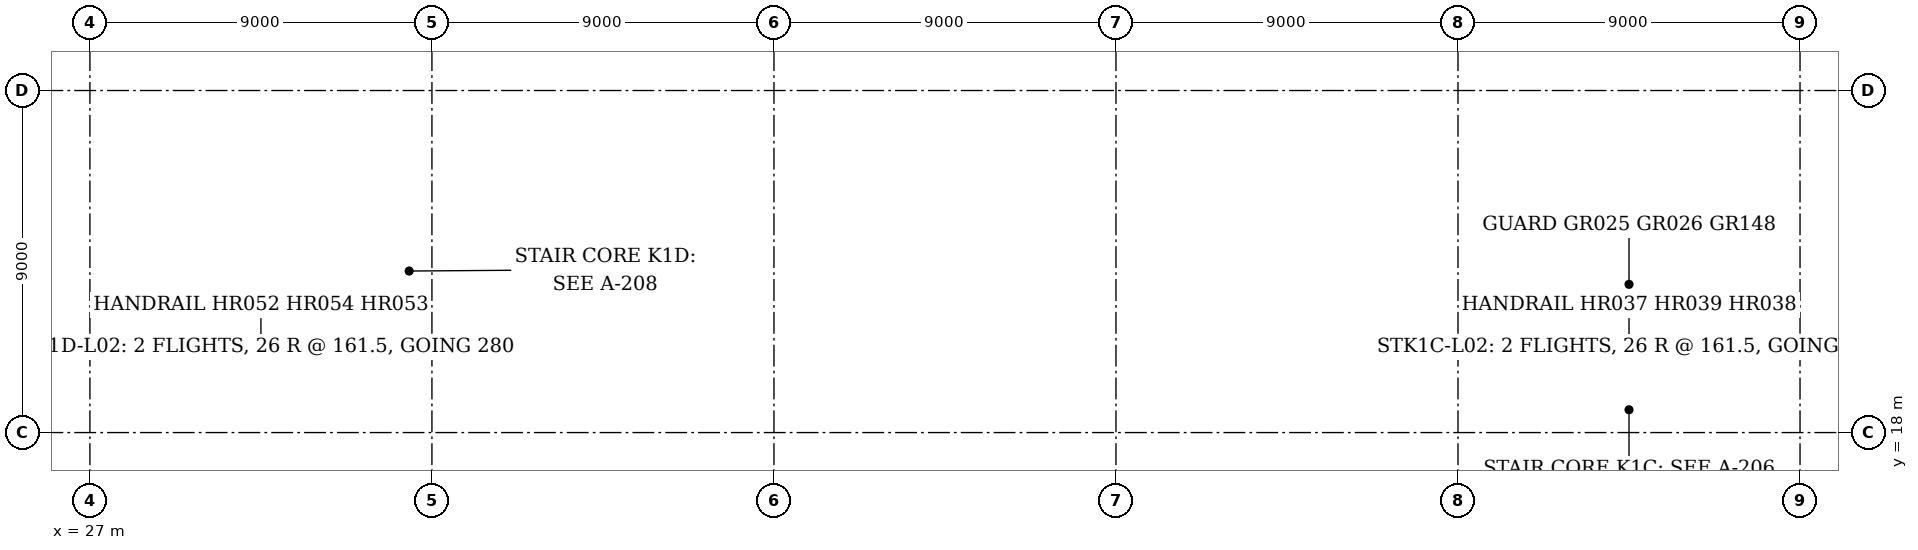
"""IFC4 building model, lengths in metres.
Left out: names, types, materials, properties, quantities, classifications, styles, units other than length and angle.
Written with IfcOpenShell. Run it as: python <this file> out.ifc"""

import sys

from ifc_helpers import new_model, si_unit, direction, frame, frame_2d, origin, origin_2d, place, context, subcontext, project, spatial, rectangle, hollow_rectangle, i_section, extrude, element, fill, save


model = new_model("IFC4")
c1 = context("Model", 3, precision=1e-05, world=origin(), true_north=direction((0.0, 1.0)))
c2 = subcontext(c1, "Body", "Model", "MODEL_VIEW")
j1 = project(units=[si_unit("LENGTHUNIT", "METRE"), si_unit("PLANEANGLEUNIT", "RADIAN")], contexts=[c1])
p1 = place(None, origin())
s1 = spatial("IfcSite", under=j1, at=p1, CompositionType="ELEMENT")
p2 = place(p1, origin())
s2 = spatial("IfcBuilding", under=s1, at=p2, CompositionType="ELEMENT")
p3 = place(p2, frame((0.0, 0.0, 9.2)))
s3 = spatial("IfcBuildingStorey", under=s2, at=p3, CompositionType="ELEMENT", Elevation=9.2)
p4 = place(p3, frame((45.0, 18.0, 0.0), z_axis=(0.0, 0.0, 1.0), x_axis=(1.0, 0.0, 0.0)))
e1 = element("IfcColumn", 1, at=p4, inside=s3, PredefinedType="COLUMN", context=c2, shape_type="SweptSolid", body=[
    extrude(hollow_rectangle(XDim=0.3, YDim=0.3, WallThickness=0.016, InnerFilletRadius=0.024, OuterFilletRadius=0.04, at=origin_2d()), origin(), (0.0, 0.0, 1.0), 4.2),
])
p5 = place(p3, frame((54.0, 18.0, 0.0), z_axis=(0.0, 0.0, 1.0), x_axis=(1.0, 0.0, 0.0)))
e2 = element("IfcColumn", 2, at=p5, inside=s3, PredefinedType="COLUMN", context=c2, shape_type="SweptSolid", body=[
    extrude(i_section(OverallWidth=0.5, OverallDepth=0.48, WebThickness=0.04, FlangeThickness=0.04, at=origin_2d()), origin(), (0.0, 0.0, 1.0), 3.335),
])
p6 = place(p3, frame((27.0, 27.0, 0.0), z_axis=(0.0, 0.0, 1.0), x_axis=(1.0, 0.0, 0.0)))
e3 = element("IfcColumn", 3, at=p6, inside=s3, PredefinedType="COLUMN", context=c2, shape_type="SweptSolid", body=[
    extrude(hollow_rectangle(XDim=0.3, YDim=0.3, WallThickness=0.01, InnerFilletRadius=0.015, OuterFilletRadius=0.025, at=origin_2d()), origin(), (0.0, 0.0, 1.0), 4.2),
])
p7 = place(p3, frame((36.0, 27.0, 0.0), z_axis=(0.0, 0.0, 1.0), x_axis=(1.0, 0.0, 0.0)))
e4 = element("IfcColumn", 4, at=p7, inside=s3, PredefinedType="COLUMN", context=c2, shape_type="SweptSolid", body=[
    extrude(i_section(OverallWidth=0.5, OverallDepth=0.48, WebThickness=0.04, FlangeThickness=0.04, at=origin_2d()), origin(), (0.0, 0.0, 1.0), 3.335),
])
p8 = place(p3, frame((45.0, 27.0, 0.0), z_axis=(0.0, 0.0, 1.0), x_axis=(1.0, 0.0, 0.0)))
e5 = element("IfcColumn", 5, at=p8, inside=s3, PredefinedType="COLUMN", context=c2, shape_type="SweptSolid", body=[
    extrude(i_section(OverallWidth=0.254, OverallDepth=0.254, WebThickness=0.009, FlangeThickness=0.014, FilletRadius=0.014, at=origin_2d()), origin(), (0.0, 0.0, 1.0), 4.2),
])
p9 = place(p3, frame((54.0, 27.0, 0.0), z_axis=(0.0, 0.0, 1.0), x_axis=(1.0, 0.0, 0.0)))
e6 = element("IfcColumn", 6, at=p9, inside=s3, PredefinedType="COLUMN", context=c2, shape_type="SweptSolid", body=[
    extrude(i_section(OverallWidth=0.5, OverallDepth=0.48, WebThickness=0.04, FlangeThickness=0.04, at=origin_2d()), origin(), (0.0, 0.0, 1.0), 3.335),
])
p10 = place(p3, frame((63.0, 27.0, 0.0), z_axis=(0.0, 0.0, 1.0), x_axis=(1.0, 0.0, 0.0)))
e7 = element("IfcColumn", 7, at=p10, inside=s3, PredefinedType="COLUMN", context=c2, shape_type="SweptSolid", body=[
    extrude(i_section(OverallWidth=0.305, OverallDepth=0.308, WebThickness=0.01, FlangeThickness=0.015, FilletRadius=0.017, at=origin_2d()), origin(), (0.0, 0.0, 1.0), 4.2),
])
p11 = place(p3, frame((27.09, 27.15, 0.0), z_axis=(0.0, 0.0, 1.0), x_axis=(0.0, 1.0, 0.0)))
e8 = element("IfcWall", 8, at=p11, inside=s3, PredefinedType="SOLIDWALL", context=c2, shape_type="SweptSolid", body=[
    extrude(rectangle(XDim=8.7, YDim=0.3, at=frame_2d((4.35, 0.0))), origin(), (0.0, 0.0, 1.0), 3.578),
])
p12 = place(p11, frame((1.5, 0.0, 0.9)))
e9 = element("IfcOpeningElement", 9, at=p12, cuts=e8, PredefinedType="OPENING", context=c2, shape_type="SweptSolid", body=[
    extrude(rectangle(XDim=1.2, YDim=2.3, at=frame_2d((0.6, 1.15))), frame((0.0, 0.16, 0.0), z_axis=(0.0, -1.0, 0.0), x_axis=(1.0, 0.0, 0.0)), (0.0, 0.0, 1.0), 0.32),
])
p13 = place(p11, frame((6.0, 0.0, 0.9)))
e10 = element("IfcOpeningElement", 10, at=p13, cuts=e8, PredefinedType="OPENING", context=c2, shape_type="SweptSolid", body=[
    extrude(rectangle(XDim=1.2, YDim=2.3, at=frame_2d((0.6, 1.15))), frame((0.0, 0.16, 0.0), z_axis=(0.0, -1.0, 0.0), x_axis=(1.0, 0.0, 0.0)), (0.0, 0.0, 1.0), 0.32),
])
p14 = place(p3, frame((27.09, 22.5, 0.0), z_axis=(0.0, 0.0, 1.0), x_axis=(0.0, 1.0, 0.0)))
e11 = element("IfcWall", 11, at=p14, inside=s3, PredefinedType="SOLIDWALL", context=c2, shape_type="SweptSolid", body=[
    extrude(rectangle(XDim=4.35, YDim=0.3, at=frame_2d((2.175, 0.0))), origin(), (0.0, 0.0, 1.0), 3.578),
])
p15 = place(p3, frame((36.0, 18.09, 0.0), z_axis=(0.0, 0.0, 1.0), x_axis=(1.0, 0.0, 0.0)))
e12 = element("IfcWall", 12, at=p15, inside=s3, PredefinedType="SOLIDWALL", context=c2, shape_type="SweptSolid", body=[
    extrude(rectangle(XDim=8.85, YDim=0.3, at=frame_2d((4.425, 0.0))), origin(), (0.0, 0.0, 1.0), 3.502),
])
p16 = place(p15, frame((1.65, 0.0, 0.9)))
e13 = element("IfcOpeningElement", 13, at=p16, cuts=e12, PredefinedType="OPENING", context=c2, shape_type="SweptSolid", body=[
    extrude(rectangle(XDim=1.2, YDim=2.3, at=frame_2d((0.6, 1.15))), frame((0.0, 0.16, 0.0), z_axis=(0.0, -1.0, 0.0), x_axis=(1.0, 0.0, 0.0)), (0.0, 0.0, 1.0), 0.32),
])
p17 = place(p15, frame((6.15, 0.0, 0.9)))
e14 = element("IfcOpeningElement", 14, at=p17, cuts=e12, PredefinedType="OPENING", context=c2, shape_type="SweptSolid", body=[
    extrude(rectangle(XDim=1.2, YDim=2.3, at=frame_2d((0.6, 1.15))), frame((0.0, 0.16, 0.0), z_axis=(0.0, -1.0, 0.0), x_axis=(1.0, 0.0, 0.0)), (0.0, 0.0, 1.0), 0.32),
])
p18 = place(p3, frame((54.25, 18.09, 0.0), z_axis=(0.0, 0.0, 1.0), x_axis=(1.0, 0.0, 0.0)))
e15 = element("IfcWall", 15, at=p18, inside=s3, PredefinedType="SOLIDWALL", context=c2, shape_type="SweptSolid", body=[
    extrude(rectangle(XDim=8.75, YDim=0.3, at=frame_2d((4.375, 0.0))), origin(), (0.0, 0.0, 1.0), 3.578),
])
p19 = place(p18, frame((1.4, 0.0, 0.9)))
e16 = element("IfcOpeningElement", 16, at=p19, cuts=e15, PredefinedType="OPENING", context=c2, shape_type="SweptSolid", body=[
    extrude(rectangle(XDim=1.2, YDim=2.3, at=frame_2d((0.6, 1.15))), frame((0.0, 0.16, 0.0), z_axis=(0.0, -1.0, 0.0), x_axis=(1.0, 0.0, 0.0)), (0.0, 0.0, 1.0), 0.32),
])
p20 = place(p18, frame((5.9, 0.0, 0.9)))
e17 = element("IfcOpeningElement", 17, at=p20, cuts=e15, PredefinedType="OPENING", context=c2, shape_type="SweptSolid", body=[
    extrude(rectangle(XDim=1.2, YDim=2.3, at=frame_2d((0.6, 1.15))), frame((0.0, 0.16, 0.0), z_axis=(0.0, -1.0, 0.0), x_axis=(1.0, 0.0, 0.0)), (0.0, 0.0, 1.0), 0.32),
])
p21 = place(p3, frame((72.1, 9.0, 0.0), z_axis=(0.0, 0.0, 1.0), x_axis=(0.0, 1.0, 0.0)))
e18 = element("IfcWall", 18, at=p21, inside=s3, PredefinedType="SOLIDWALL", context=c2, shape_type="SweptSolid", body=[
    extrude(rectangle(XDim=9.0, YDim=0.32, at=frame_2d((4.5, 0.0))), origin(), (0.0, 0.0, 1.0), 4.035),
])
p22 = place(p3, frame((63.0, 18.15, 0.0), z_axis=(0.0, 0.0, 1.0), x_axis=(1.0, 0.0, 0.0)))
e19 = element("IfcWall", 19, at=p22, inside=s3, PredefinedType="SOLIDWALL", context=c2, shape_type="SweptSolid", body=[
    extrude(rectangle(XDim=9.0, YDim=0.3, at=frame_2d((4.5, 0.0))), origin(), (0.0, 0.0, 1.0), 4.2),
])
p23 = place(p3, frame((71.85, 18.3, 0.0), z_axis=(0.0, 0.0, 1.0), x_axis=(0.0, 1.0, 0.0)))
e20 = element("IfcWall", 20, at=p23, inside=s3, PredefinedType="SOLIDWALL", context=c2, shape_type="SweptSolid", body=[
    extrude(rectangle(XDim=3.9, YDim=0.3, at=frame_2d((1.95, 0.0))), origin(), (0.0, 0.0, 1.0), 4.2),
])
p24 = place(p3, frame((63.0, 22.35, 0.0), z_axis=(0.0, 0.0, 1.0), x_axis=(1.0, 0.0, 0.0)))
e21 = element("IfcWall", 21, at=p24, inside=s3, PredefinedType="SOLIDWALL", context=c2, shape_type="SweptSolid", body=[
    extrude(rectangle(XDim=9.0, YDim=0.3, at=frame_2d((4.5, 0.0))), origin(), (0.0, 0.0, 1.0), 4.2),
])
p25 = place(p3, frame((63.15, 18.3, 0.0), z_axis=(0.0, 0.0, 1.0), x_axis=(0.0, 1.0, 0.0)))
e22 = element("IfcWall", 22, at=p25, inside=s3, PredefinedType="SOLIDWALL", context=c2, shape_type="SweptSolid", body=[
    extrude(rectangle(XDim=3.9, YDim=0.3, at=frame_2d((1.95, 0.0))), origin(), (0.0, 0.0, 1.0), 4.2),
])
p26 = place(p25, frame((1.05, 0.0, 0.0)))
e23 = element("IfcOpeningElement", 23, at=p26, cuts=e22, PredefinedType="OPENING", context=c2, shape_type="SweptSolid", body=[
    extrude(rectangle(XDim=1.8, YDim=2.1, at=frame_2d((0.9, 1.05))), frame((0.0, 0.16, 0.0), z_axis=(0.0, -1.0, 0.0), x_axis=(1.0, 0.0, 0.0)), (0.0, 0.0, 1.0), 0.32),
])
p27 = place(p3, frame((27.0, 18.15, 0.0), z_axis=(0.0, 0.0, 1.0), x_axis=(1.0, 0.0, 0.0)))
e24 = element("IfcWall", 24, at=p27, inside=s3, PredefinedType="SOLIDWALL", context=c2, shape_type="SweptSolid", body=[
    extrude(rectangle(XDim=9.0, YDim=0.3, at=frame_2d((4.5, 0.0))), origin(), (0.0, 0.0, 1.0), 4.2),
])
p28 = place(p3, frame((35.85, 18.3, 0.0), z_axis=(0.0, 0.0, 1.0), x_axis=(0.0, 1.0, 0.0)))
e25 = element("IfcWall", 25, at=p28, inside=s3, PredefinedType="SOLIDWALL", context=c2, shape_type="SweptSolid", body=[
    extrude(rectangle(XDim=3.9, YDim=0.3, at=frame_2d((1.95, 0.0))), origin(), (0.0, 0.0, 1.0), 4.2),
])
p29 = place(p28, frame((1.05, 0.0, 0.0)))
e26 = element("IfcOpeningElement", 26, at=p29, cuts=e25, PredefinedType="OPENING", context=c2, shape_type="SweptSolid", body=[
    extrude(rectangle(XDim=1.8, YDim=2.1, at=frame_2d((0.9, 1.05))), frame((0.0, 0.16, 0.0), z_axis=(0.0, -1.0, 0.0), x_axis=(1.0, 0.0, 0.0)), (0.0, 0.0, 1.0), 0.32),
])
p30 = place(p3, frame((27.0, 22.35, 0.0), z_axis=(0.0, 0.0, 1.0), x_axis=(1.0, 0.0, 0.0)))
e27 = element("IfcWall", 27, at=p30, inside=s3, PredefinedType="SOLIDWALL", context=c2, shape_type="SweptSolid", body=[
    extrude(rectangle(XDim=9.0, YDim=0.3, at=frame_2d((4.5, 0.0))), origin(), (0.0, 0.0, 1.0), 4.2),
])
p31 = place(p3, frame((27.15, 18.3, 0.0), z_axis=(0.0, 0.0, 1.0), x_axis=(0.0, 1.0, 0.0)))
e28 = element("IfcWall", 28, at=p31, inside=s3, PredefinedType="SOLIDWALL", context=c2, shape_type="SweptSolid", body=[
    extrude(rectangle(XDim=3.9, YDim=0.3, at=frame_2d((1.95, 0.0))), origin(), (0.0, 0.0, 1.0), 4.2),
])
p32 = place(p3, frame((72.0, 27.15, 0.0), z_axis=(0.0, 0.0, 1.0), x_axis=(1.0, 0.0, 0.0)))
e29 = element("IfcWall", 29, at=p32, inside=s3, PredefinedType="SOLIDWALL", context=c2, shape_type="SweptSolid", body=[
    extrude(rectangle(XDim=4.5, YDim=0.3, at=frame_2d((2.25, 0.0))), origin(), (0.0, 0.0, 1.0), 4.2),
])
p33 = place(p3, frame((72.15, 27.3, 0.0), z_axis=(0.0, 0.0, 1.0), x_axis=(0.0, 1.0, 0.0)))
e30 = element("IfcWall", 30, at=p33, inside=s3, PredefinedType="SOLIDWALL", context=c2, shape_type="SweptSolid", body=[
    extrude(rectangle(XDim=8.4, YDim=0.3, at=frame_2d((4.2, 0.0))), origin(), (0.0, 0.0, 1.0), 4.2),
])
p34 = place(p33, frame((0.45, 0.0, 0.0)))
e31 = element("IfcOpeningElement", 31, at=p34, cuts=e30, PredefinedType="OPENING", context=c2, shape_type="SweptSolid", body=[
    extrude(rectangle(XDim=1.4, YDim=2.1, at=frame_2d((0.7, 1.05))), frame((0.0, 0.16, 0.0), z_axis=(0.0, -1.0, 0.0), x_axis=(1.0, 0.0, 0.0)), (0.0, 0.0, 1.0), 0.32),
])
p35 = place(p3, frame((27.15, 27.0, 0.0), z_axis=(0.0, 0.0, 1.0), x_axis=(1.0, 0.0, 0.0)))
e32 = element("IfcWall", 32, at=p35, inside=s3, PredefinedType="PARTITIONING", context=c2, shape_type="SweptSolid", body=[
    extrude(rectangle(XDim=8.6, YDim=0.15, at=frame_2d((4.3, 0.0))), origin(), (0.0, 0.0, 1.0), 3.502),
])
p36 = place(p3, frame((36.25, 27.0, 0.0), z_axis=(0.0, 0.0, 1.0), x_axis=(1.0, 0.0, 0.0)))
e33 = element("IfcWall", 33, at=p36, inside=s3, PredefinedType="PARTITIONING", context=c2, shape_type="SweptSolid", body=[
    extrude(rectangle(XDim=8.877, YDim=0.15, at=frame_2d((4.438, 0.0))), origin(), (0.0, 0.0, 1.0), 3.502),
])
p37 = place(p36, frame((3.25, 0.0, 0.0)))
e34 = element("IfcOpeningElement", 34, at=p37, cuts=e33, PredefinedType="OPENING", context=c2, shape_type="SweptSolid", body=[
    extrude(rectangle(XDim=2.4, YDim=2.4, at=frame_2d((1.2, 1.2))), frame((0.0, 0.085, 0.0), z_axis=(0.0, -1.0, 0.0), x_axis=(1.0, 0.0, 0.0)), (0.0, 0.0, 1.0), 0.17),
])
p38 = place(p3, frame((45.127, 27.0, 0.0), z_axis=(0.0, 0.0, 1.0), x_axis=(1.0, 0.0, 0.0)))
e35 = element("IfcWall", 35, at=p38, inside=s3, PredefinedType="PARTITIONING", context=c2, shape_type="SweptSolid", body=[
    extrude(rectangle(XDim=8.623, YDim=0.15, at=frame_2d((4.312, 0.0))), origin(), (0.0, 0.0, 1.0), 3.502),
])
p39 = place(p38, frame((3.085, 0.0, 0.0)))
e36 = element("IfcOpeningElement", 36, at=p39, cuts=e35, PredefinedType="OPENING", context=c2, shape_type="SweptSolid", body=[
    extrude(rectangle(XDim=2.4, YDim=2.4, at=frame_2d((1.2, 1.2))), frame((0.0, 0.085, 0.0), z_axis=(0.0, -1.0, 0.0), x_axis=(1.0, 0.0, 0.0)), (0.0, 0.0, 1.0), 0.17),
])
p40 = place(p3, frame((54.25, 27.0, 0.0), z_axis=(0.0, 0.0, 1.0), x_axis=(1.0, 0.0, 0.0)))
e37 = element("IfcWall", 37, at=p40, inside=s3, PredefinedType="PARTITIONING", context=c2, shape_type="SweptSolid", body=[
    extrude(rectangle(XDim=8.597, YDim=0.15, at=frame_2d((4.299, 0.0))), origin(), (0.0, 0.0, 1.0), 3.502),
])
p41 = place(p3, frame((66.076, 27.0, 0.0), z_axis=(0.0, 0.0, 1.0), x_axis=(1.0, 0.0, 0.0)))
e38 = element("IfcWall", 38, at=p41, inside=s3, PredefinedType="PARTITIONING", context=c2, shape_type="SweptSolid", body=[
    extrude(rectangle(XDim=3.0, YDim=0.2, at=frame_2d((1.5, 0.0))), origin(), (0.0, 0.0, 1.0), 3.502),
])
p42 = place(p41, frame((0.55, 0.0, 0.0)))
e39 = element("IfcOpeningElement", 39, at=p42, cuts=e38, PredefinedType="OPENING", context=c2, shape_type="SweptSolid", body=[
    extrude(rectangle(XDim=1.8, YDim=2.1, at=frame_2d((0.9, 1.05))), frame((0.0, 0.11, 0.0), z_axis=(0.0, -1.0, 0.0), x_axis=(1.0, 0.0, 0.0)), (0.0, 0.0, 1.0), 0.22),
])
p43 = place(p3, frame((72.0, 22.5, 0.0), z_axis=(0.0, 0.0, 1.0), x_axis=(0.0, 1.0, 0.0)))
e40 = element("IfcWall", 40, at=p43, inside=s3, PredefinedType="PARTITIONING", context=c2, shape_type="SweptSolid", body=[
    extrude(rectangle(XDim=4.5, YDim=0.15, at=frame_2d((2.25, 0.0))), origin(), (0.0, 0.0, 1.0), 3.502),
])
p44 = place(p16, origin())
e41 = element("IfcWindow", 41, at=p44, inside=s3, PartitioningType="SINGLE_PANEL", PredefinedType="WINDOW", context=c2, shape_type="SweptSolid", body=[
    extrude(rectangle(XDim=1.2, YDim=2.3, at=frame_2d((0.6, 1.15))), frame((0.0, 0.03, 0.0), z_axis=(0.0, -1.0, 0.0), x_axis=(1.0, 0.0, 0.0)), (0.0, 0.0, 1.0), 0.06),
])
fill(e13, e41)
p45 = place(p17, origin())
e42 = element("IfcWindow", 42, at=p45, inside=s3, PartitioningType="SINGLE_PANEL", PredefinedType="WINDOW", context=c2, shape_type="SweptSolid", body=[
    extrude(rectangle(XDim=1.2, YDim=2.3, at=frame_2d((0.6, 1.15))), frame((0.0, 0.03, 0.0), z_axis=(0.0, -1.0, 0.0), x_axis=(1.0, 0.0, 0.0)), (0.0, 0.0, 1.0), 0.06),
])
fill(e14, e42)
p46 = place(p19, origin())
e43 = element("IfcWindow", 43, at=p46, inside=s3, PartitioningType="SINGLE_PANEL", PredefinedType="WINDOW", context=c2, shape_type="SweptSolid", body=[
    extrude(rectangle(XDim=1.2, YDim=2.3, at=frame_2d((0.6, 1.15))), frame((0.0, 0.03, 0.0), z_axis=(0.0, -1.0, 0.0), x_axis=(1.0, 0.0, 0.0)), (0.0, 0.0, 1.0), 0.06),
])
fill(e16, e43)
p47 = place(p20, origin())
e44 = element("IfcWindow", 44, at=p47, inside=s3, PartitioningType="SINGLE_PANEL", PredefinedType="WINDOW", context=c2, shape_type="SweptSolid", body=[
    extrude(rectangle(XDim=1.2, YDim=2.3, at=frame_2d((0.6, 1.15))), frame((0.0, 0.03, 0.0), z_axis=(0.0, -1.0, 0.0), x_axis=(1.0, 0.0, 0.0)), (0.0, 0.0, 1.0), 0.06),
])
fill(e17, e44)
p48 = place(p26, frame((1.8, 0.0, 0.0), z_axis=(0.0, 0.0, 1.0), x_axis=(-1.0, 0.0, 0.0)))
e45 = element("IfcDoor", 45, at=p48, inside=s3, OperationType="DOUBLE_DOOR_SINGLE_SWING", PredefinedType="DOOR", context=c2, shape_type="SweptSolid", body=[
    extrude(rectangle(XDim=1.8, YDim=2.1, at=frame_2d((0.9, 1.05))), frame((0.0, 0.025, 0.0), z_axis=(0.0, -1.0, 0.0), x_axis=(1.0, 0.0, 0.0)), (0.0, 0.0, 1.0), 0.05),
])
fill(e23, e45)
p49 = place(p29, origin())
e46 = element("IfcDoor", 46, at=p49, inside=s3, OperationType="DOUBLE_DOOR_SINGLE_SWING", PredefinedType="DOOR", context=c2, shape_type="SweptSolid", body=[
    extrude(rectangle(XDim=1.8, YDim=2.1, at=frame_2d((0.9, 1.05))), frame((0.0, 0.025, 0.0), z_axis=(0.0, -1.0, 0.0), x_axis=(1.0, 0.0, 0.0)), (0.0, 0.0, 1.0), 0.05),
])
fill(e26, e46)
p50 = place(p34, origin())
e47 = element("IfcDoor", 47, at=p50, inside=s3, OperationType="SLIDING_TO_RIGHT", PredefinedType="DOOR", context=c2, shape_type="SweptSolid", body=[
    extrude(rectangle(XDim=1.4, YDim=2.1, at=frame_2d((0.7, 1.05))), frame((0.0, 0.025, 0.0), z_axis=(0.0, -1.0, 0.0), x_axis=(1.0, 0.0, 0.0)), (0.0, 0.0, 1.0), 0.05),
])
fill(e31, e47)
p51 = place(p37, origin())
e48 = element("IfcDoor", 48, at=p51, inside=s3, OperationType="DOUBLE_DOOR_SINGLE_SWING", PredefinedType="DOOR", context=c2, shape_type="SweptSolid", body=[
    extrude(rectangle(XDim=2.4, YDim=2.4, at=frame_2d((1.2, 1.2))), frame((0.0, 0.025, 0.0), z_axis=(0.0, -1.0, 0.0), x_axis=(1.0, 0.0, 0.0)), (0.0, 0.0, 1.0), 0.05),
])
fill(e34, e48)
p52 = place(p39, origin())
e49 = element("IfcDoor", 49, at=p52, inside=s3, OperationType="DOUBLE_DOOR_SINGLE_SWING", PredefinedType="DOOR", context=c2, shape_type="SweptSolid", body=[
    extrude(rectangle(XDim=2.4, YDim=2.4, at=frame_2d((1.2, 1.2))), frame((0.0, 0.025, 0.0), z_axis=(0.0, -1.0, 0.0), x_axis=(1.0, 0.0, 0.0)), (0.0, 0.0, 1.0), 0.05),
])
fill(e36, e49)
p53 = place(p42, frame((1.8, 0.0, 0.0), z_axis=(0.0, 0.0, 1.0), x_axis=(-1.0, 0.0, 0.0)))
e50 = element("IfcDoor", 50, at=p53, inside=s3, OperationType="DOUBLE_DOOR_SINGLE_SWING", PredefinedType="DOOR", context=c2, shape_type="SweptSolid", body=[
    extrude(rectangle(XDim=1.8, YDim=2.1, at=frame_2d((0.9, 1.05))), frame((0.0, 0.025, 0.0), z_axis=(0.0, -1.0, 0.0), x_axis=(1.0, 0.0, 0.0)), (0.0, 0.0, 1.0), 0.05),
])
fill(e39, e50)
save(model, sys.argv[1])
